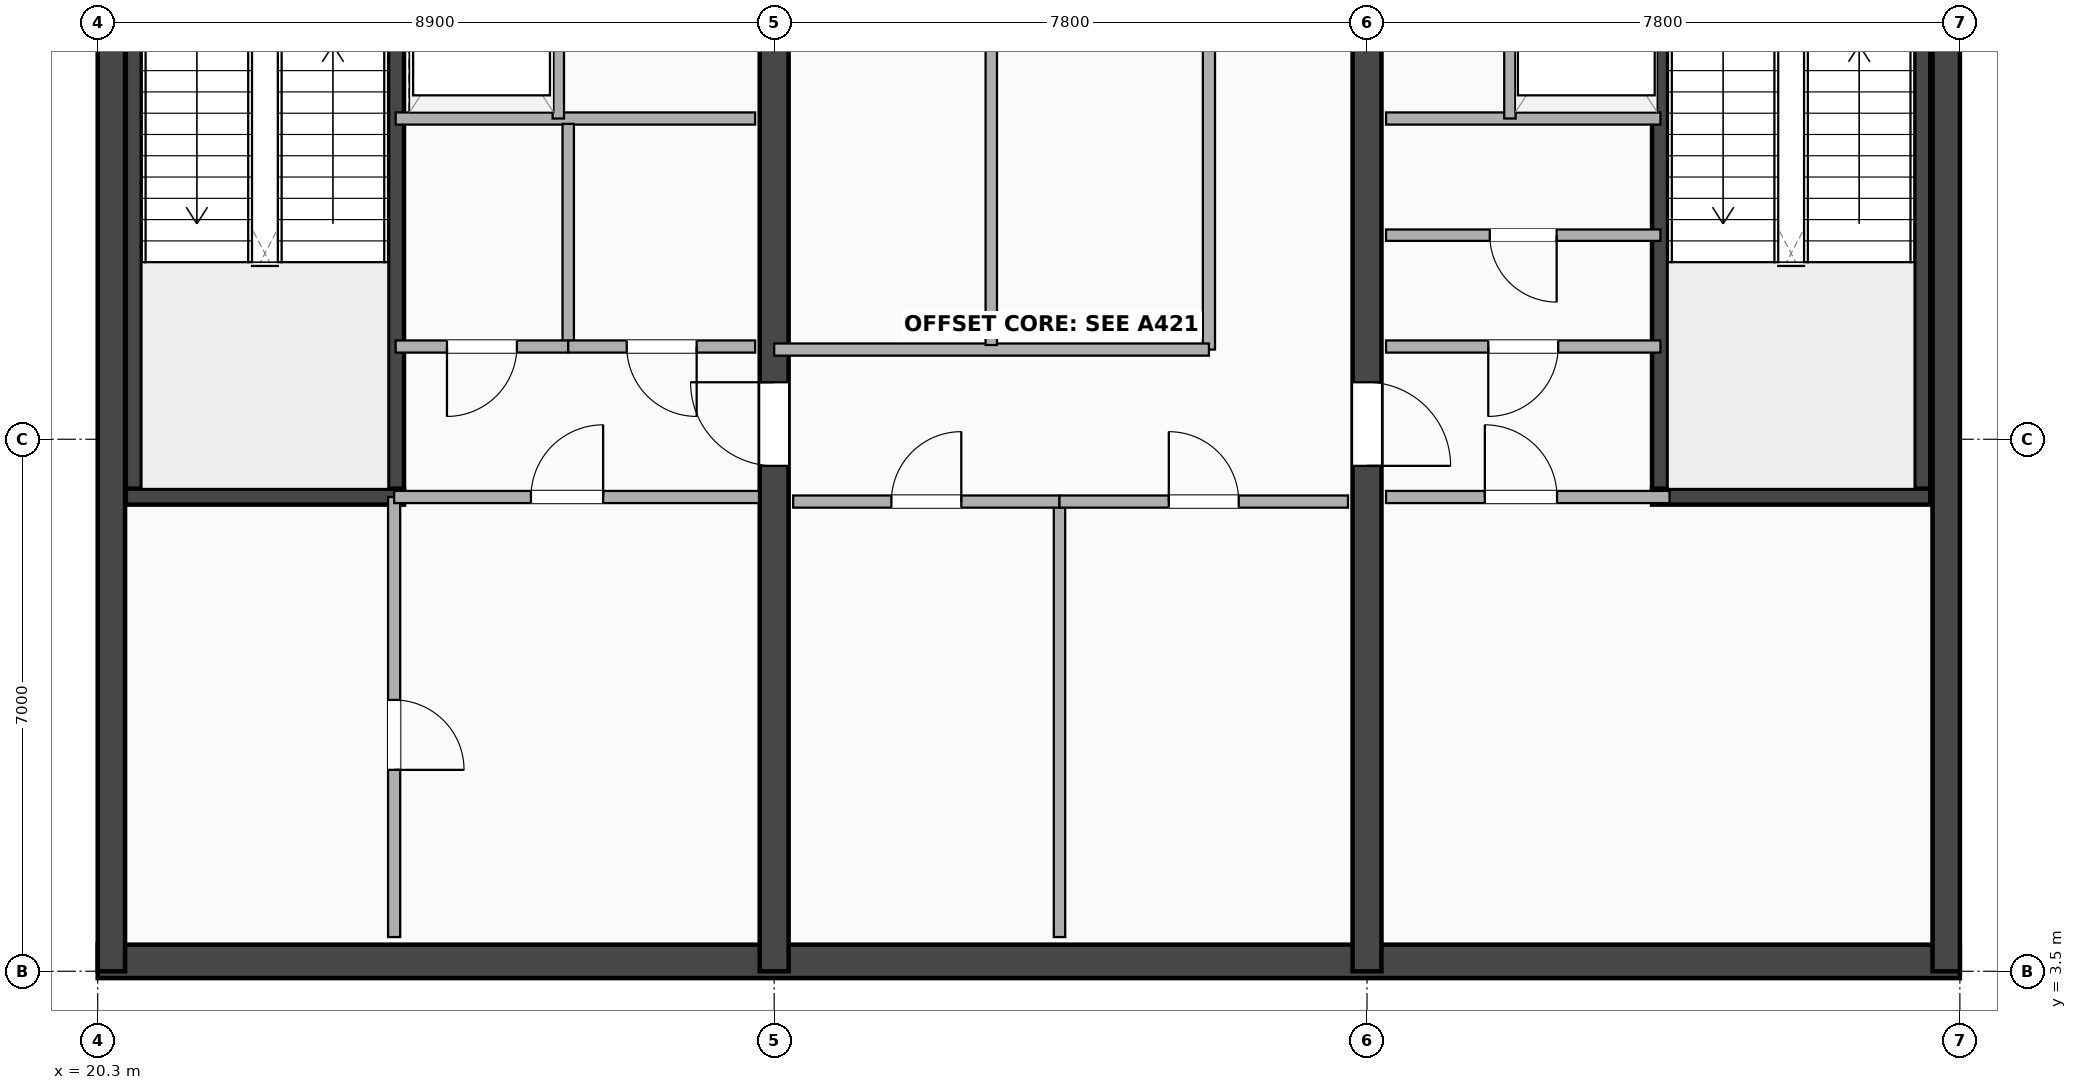
"""IFC4 building model, lengths in metres.
Left out: names, types, materials, properties, quantities, classifications, styles, units other than length and angle.
Written with IfcOpenShell. Run it as: python <this file> out.ifc"""

import sys

from ifc_helpers import new_model, si_unit, direction, frame, frame_2d, origin, place, context, subcontext, project, spatial, rectangle, extrude, element, fill, save


model = new_model("IFC4")
c1 = context("Model", 3, precision=1e-05, world=origin(), true_north=direction((0.0, 1.0)))
c2 = subcontext(c1, "Body", "Model", "MODEL_VIEW")
j1 = project(units=[si_unit("LENGTHUNIT", "METRE"), si_unit("PLANEANGLEUNIT", "RADIAN")], contexts=[c1])
p1 = place(None, origin())
s1 = spatial("IfcSite", under=j1, at=p1, CompositionType="ELEMENT")
p2 = place(p1, origin())
s2 = spatial("IfcBuilding", under=s1, at=p2, CompositionType="ELEMENT")
p3 = place(p2, frame((0.0, 0.0, 312.5)))
s3 = spatial("IfcBuildingStorey", under=s2, at=p3, CompositionType="ELEMENT", Elevation=312.5)
p4 = place(p3, frame((20.3, 3.63, 0.0), z_axis=(0.0, 0.0, 1.0), x_axis=(1.0, 0.0, 0.0)))
e1 = element("IfcWall", 1, at=p4, inside=s3, PredefinedType="SHEAR", context=c2, shape_type="SweptSolid", body=[
    extrude(rectangle(XDim=24.5, YDim=0.44, at=frame_2d((12.25, 0.0))), origin(), (0.0, 0.0, 1.0), 4.3),
])
for number, where, z_axis, x_axis in (
    (2, (20.48, 3.5, 0.0), (0.0, 0.0, 1.0), (0.0, 1.0, 0.0)),
    (3, (44.62, 3.5, 0.0), (0.0, 0.0, 1.0), (0.0, 1.0, 0.0)),
):
    element("IfcWall", number, at=place(p3, frame(where, z_axis=z_axis, x_axis=x_axis)), inside=s3, PredefinedType="SHEAR", context=c2, shape_type="SweptSolid", body=[
        extrude(rectangle(XDim=21.2, YDim=0.36, at=frame_2d((10.6, 0.0))), origin(), (0.0, 0.0, 1.0), 4.3),
    ])
p5 = place(p3, frame((29.2, 3.5, 0.0), z_axis=(0.0, 0.0, 1.0), x_axis=(0.0, 1.0, 0.0)))
e4 = element("IfcWall", 4, at=p5, inside=s3, PredefinedType="SHEAR", context=c2, shape_type="SweptSolid", body=[
    extrude(rectangle(XDim=14.95, YDim=0.38, at=frame_2d((7.475, 0.0))), origin(), (0.0, 0.0, 1.0), 4.3),
])
p6 = place(p5, frame((7.75, 0.0, 0.0), z_axis=(0.0, 0.0, 1.0), x_axis=(-1.0, 0.0, 0.0)))
e5 = element("IfcOpeningElement", 5, at=p6, cuts=e4, PredefinedType="OPENING", context=c2, shape_type="SweptSolid", body=[
    extrude(rectangle(XDim=1.1, YDim=2.15, at=frame_2d((0.55, 1.075))), frame((0.0, 0.2, 0.0), z_axis=(0.0, -1.0, 0.0), x_axis=(1.0, 0.0, 0.0)), (0.0, 0.0, 1.0), 0.4),
])
p7 = place(p3, frame((37.0, 3.5, 0.0), z_axis=(0.0, 0.0, 1.0), x_axis=(0.0, 1.0, 0.0)))
e6 = element("IfcWall", 6, at=p7, inside=s3, PredefinedType="SHEAR", context=c2, shape_type="SweptSolid", body=[
    extrude(rectangle(XDim=14.95, YDim=0.38, at=frame_2d((7.475, 0.0))), origin(), (0.0, 0.0, 1.0), 4.3),
])
p8 = place(p7, frame((6.65, 0.0, 0.0)))
e7 = element("IfcOpeningElement", 7, at=p8, cuts=e6, PredefinedType="OPENING", context=c2, shape_type="SweptSolid", body=[
    extrude(rectangle(XDim=1.1, YDim=2.15, at=frame_2d((0.55, 1.075))), frame((0.0, 0.2, 0.0), z_axis=(0.0, -1.0, 0.0), x_axis=(1.0, 0.0, 0.0)), (0.0, 0.0, 1.0), 0.4),
])
for number, where, z_axis, x_axis in (
    (8, (20.775, 9.745, 0.0), (0.0, 0.0, 1.0), (0.0, 1.0, 0.0)),
    (9, (24.225, 9.745, 0.0), (0.0, 0.0, 1.0), (0.0, 1.0, 0.0)),
):
    element("IfcWall", number, at=place(p3, frame(where, z_axis=z_axis, x_axis=x_axis)), inside=s3, PredefinedType="SHEAR", context=c2, shape_type="SweptSolid", body=[
        extrude(rectangle(XDim=8.01, YDim=0.21, at=frame_2d((4.005, 0.0))), origin(), (0.0, 0.0, 1.0), 4.3),
    ])
p9 = place(p3, frame((20.67, 9.745, 0.0), z_axis=(0.0, 0.0, 1.0), x_axis=(1.0, 0.0, 0.0)))
e10 = element("IfcWall", 10, at=p9, inside=s3, PredefinedType="SHEAR", context=c2, shape_type="SweptSolid", body=[
    extrude(rectangle(XDim=3.66, YDim=0.21, at=frame_2d((1.83, 0.0))), origin(), (0.0, 0.0, 1.0), 4.3),
])
for number, where, z_axis, x_axis in (
    (11, (40.855, 9.745, 0.0), (0.0, 0.0, 1.0), (0.0, 1.0, 0.0)),
    (12, (44.305, 9.745, 0.0), (0.0, 0.0, 1.0), (0.0, 1.0, 0.0)),
):
    element("IfcWall", number, at=place(p3, frame(where, z_axis=z_axis, x_axis=x_axis)), inside=s3, PredefinedType="SHEAR", context=c2, shape_type="SweptSolid", body=[
        extrude(rectangle(XDim=8.01, YDim=0.21, at=frame_2d((4.005, 0.0))), origin(), (0.0, 0.0, 1.0), 4.3),
    ])
p10 = place(p3, frame((40.75, 9.745, 0.0), z_axis=(0.0, 0.0, 1.0), x_axis=(1.0, 0.0, 0.0)))
e13 = element("IfcWall", 13, at=p10, inside=s3, PredefinedType="SHEAR", context=c2, shape_type="SweptSolid", body=[
    extrude(rectangle(XDim=3.66, YDim=0.21, at=frame_2d((1.83, 0.0))), origin(), (0.0, 0.0, 1.0), 4.3),
])
p11 = place(p3, frame((24.22, 14.72, 0.0), z_axis=(0.0, 0.0, 1.0), x_axis=(1.0, 0.0, 0.0)))
e14 = element("IfcWall", 14, at=p11, inside=s3, PredefinedType="PARTITIONING", context=c2, shape_type="SweptSolid", body=[
    extrude(rectangle(XDim=4.73, YDim=0.16, at=frame_2d((2.365, 0.0))), origin(), (0.0, 0.0, 1.0), 4.3),
])
p12 = place(p3, frame((26.36, 14.72, 0.0), z_axis=(0.0, 0.0, 1.0), x_axis=(0.0, 1.0, 0.0)))
e15 = element("IfcWall", 15, at=p12, inside=s3, PredefinedType="PARTITIONING", context=c2, shape_type="SweptSolid", body=[
    extrude(rectangle(XDim=3.04, YDim=0.15, at=frame_2d((1.52, 0.0))), origin(), (0.0, 0.0, 1.0), 4.3),
])
p13 = place(p3, frame((37.25, 14.72, 0.0), z_axis=(0.0, 0.0, 1.0), x_axis=(1.0, 0.0, 0.0)))
e16 = element("IfcWall", 16, at=p13, inside=s3, PredefinedType="PARTITIONING", context=c2, shape_type="SweptSolid", body=[
    extrude(rectangle(XDim=3.61, YDim=0.16, at=frame_2d((1.805, 0.0))), origin(), (0.0, 0.0, 1.0), 4.3),
])
p14 = place(p3, frame((38.88, 14.72, 0.0), z_axis=(0.0, 0.0, 1.0), x_axis=(0.0, 1.0, 0.0)))
e17 = element("IfcWall", 17, at=p14, inside=s3, PredefinedType="PARTITIONING", context=c2, shape_type="SweptSolid", body=[
    extrude(rectangle(XDim=3.04, YDim=0.15, at=frame_2d((1.52, 0.0))), origin(), (0.0, 0.0, 1.0), 4.3),
])
p15 = place(p3, frame((26.49, 11.72, 0.0), z_axis=(0.0, 0.0, 1.0), x_axis=(0.0, 1.0, 0.0)))
e18 = element("IfcWall", 18, at=p15, inside=s3, PredefinedType="PARTITIONING", context=c2, shape_type="SweptSolid", body=[
    extrude(rectangle(XDim=2.93, YDim=0.15, at=frame_2d((1.465, 0.0))), origin(), (0.0, 0.0, 1.0), 4.3),
])
p16 = place(p3, frame((24.22, 11.72, 0.0), z_axis=(0.0, 0.0, 1.0), x_axis=(1.0, 0.0, 0.0)))
e19 = element("IfcWall", 19, at=p16, inside=s3, PredefinedType="PARTITIONING", context=c2, shape_type="SweptSolid", body=[
    extrude(rectangle(XDim=2.271, YDim=0.16, at=frame_2d((1.135, 0.0))), origin(), (0.0, 0.0, 1.0), 4.3),
])
p17 = place(p16, frame((0.675, 0.0, 0.0)))
e20 = element("IfcOpeningElement", 20, at=p17, cuts=e19, PredefinedType="OPENING", context=c2, shape_type="SweptSolid", body=[
    extrude(rectangle(XDim=0.92, YDim=2.08, at=frame_2d((0.46, 1.04))), frame((0.0, 0.09, 0.0), z_axis=(0.0, -1.0, 0.0), x_axis=(1.0, 0.0, 0.0)), (0.0, 0.0, 1.0), 0.18),
])
p18 = place(p3, frame((26.49, 11.72, 0.0), z_axis=(0.0, 0.0, 1.0), x_axis=(1.0, 0.0, 0.0)))
e21 = element("IfcWall", 21, at=p18, inside=s3, PredefinedType="PARTITIONING", context=c2, shape_type="SweptSolid", body=[
    extrude(rectangle(XDim=2.459, YDim=0.16, at=frame_2d((1.23, 0.0))), origin(), (0.0, 0.0, 1.0), 4.3),
])
p19 = place(p18, frame((0.77, 0.0, 0.0)))
e22 = element("IfcOpeningElement", 22, at=p19, cuts=e21, PredefinedType="OPENING", context=c2, shape_type="SweptSolid", body=[
    extrude(rectangle(XDim=0.92, YDim=2.08, at=frame_2d((0.46, 1.04))), frame((0.0, 0.09, 0.0), z_axis=(0.0, -1.0, 0.0), x_axis=(1.0, 0.0, 0.0)), (0.0, 0.0, 1.0), 0.18),
])
p20 = place(p3, frame((37.25, 11.72, 0.0), z_axis=(0.0, 0.0, 1.0), x_axis=(1.0, 0.0, 0.0)))
e23 = element("IfcWall", 23, at=p20, inside=s3, PredefinedType="PARTITIONING", context=c2, shape_type="SweptSolid", body=[
    extrude(rectangle(XDim=3.61, YDim=0.16, at=frame_2d((1.805, 0.0))), origin(), (0.0, 0.0, 1.0), 4.3),
])
p21 = place(p20, frame((1.345, 0.0, 0.0)))
e24 = element("IfcOpeningElement", 24, at=p21, cuts=e23, PredefinedType="OPENING", context=c2, shape_type="SweptSolid", body=[
    extrude(rectangle(XDim=0.92, YDim=2.08, at=frame_2d((0.46, 1.04))), frame((0.0, 0.09, 0.0), z_axis=(0.0, -1.0, 0.0), x_axis=(1.0, 0.0, 0.0)), (0.0, 0.0, 1.0), 0.18),
])
p22 = place(p3, frame((37.25, 13.185, 0.0), z_axis=(0.0, 0.0, 1.0), x_axis=(1.0, 0.0, 0.0)))
e25 = element("IfcWall", 25, at=p22, inside=s3, PredefinedType="PARTITIONING", context=c2, shape_type="SweptSolid", body=[
    extrude(rectangle(XDim=3.61, YDim=0.15, at=frame_2d((1.805, 0.0))), origin(), (0.0, 0.0, 1.0), 4.3),
])
p23 = place(p22, frame((1.365, 0.0, 0.0)))
e26 = element("IfcOpeningElement", 26, at=p23, cuts=e25, PredefinedType="OPENING", context=c2, shape_type="SweptSolid", body=[
    extrude(rectangle(XDim=0.88, YDim=2.08, at=frame_2d((0.44, 1.04))), frame((0.0, 0.085, 0.0), z_axis=(0.0, -1.0, 0.0), x_axis=(1.0, 0.0, 0.0)), (0.0, 0.0, 1.0), 0.17),
])
p24 = place(p3, frame((24.2, 3.95, 0.0), z_axis=(0.0, 0.0, 1.0), x_axis=(0.0, 1.0, 0.0)))
e27 = element("IfcWall", 27, at=p24, inside=s3, PredefinedType="PARTITIONING", context=c2, shape_type="SweptSolid", body=[
    extrude(rectangle(XDim=5.79, YDim=0.16, at=frame_2d((2.895, 0.0))), origin(), (0.0, 0.0, 1.0), 4.3),
])
p25 = place(p24, frame((2.2, 0.0, 0.0)))
e28 = element("IfcOpeningElement", 28, at=p25, cuts=e27, PredefinedType="OPENING", context=c2, shape_type="SweptSolid", body=[
    extrude(rectangle(XDim=0.92, YDim=2.08, at=frame_2d((0.46, 1.04))), frame((0.0, 0.09, 0.0), z_axis=(0.0, -1.0, 0.0), x_axis=(1.0, 0.0, 0.0)), (0.0, 0.0, 1.0), 0.18),
])
p26 = place(p3, frame((24.2, 9.74, 0.0), z_axis=(0.0, 0.0, 1.0), x_axis=(1.0, 0.0, 0.0)))
e29 = element("IfcWall", 29, at=p26, inside=s3, PredefinedType="PARTITIONING", context=c2, shape_type="SweptSolid", body=[
    extrude(rectangle(XDim=4.8, YDim=0.16, at=frame_2d((2.4, 0.0))), origin(), (0.0, 0.0, 1.0), 4.3),
])
p27 = place(p26, frame((2.75, 0.0, 0.0), z_axis=(0.0, 0.0, 1.0), x_axis=(-1.0, 0.0, 0.0)))
e30 = element("IfcOpeningElement", 30, at=p27, cuts=e29, PredefinedType="OPENING", context=c2, shape_type="SweptSolid", body=[
    extrude(rectangle(XDim=0.95, YDim=2.15, at=frame_2d((0.475, 1.075))), frame((0.0, 0.09, 0.0), z_axis=(0.0, -1.0, 0.0), x_axis=(1.0, 0.0, 0.0)), (0.0, 0.0, 1.0), 0.18),
])
p28 = place(p3, frame((37.25, 9.74, 0.0), z_axis=(0.0, 0.0, 1.0), x_axis=(1.0, 0.0, 0.0)))
e31 = element("IfcWall", 31, at=p28, inside=s3, PredefinedType="PARTITIONING", context=c2, shape_type="SweptSolid", body=[
    extrude(rectangle(XDim=3.73, YDim=0.16, at=frame_2d((1.865, 0.0))), origin(), (0.0, 0.0, 1.0), 4.3),
])
p29 = place(p28, frame((2.25, 0.0, 0.0), z_axis=(0.0, 0.0, 1.0), x_axis=(-1.0, 0.0, 0.0)))
e32 = element("IfcOpeningElement", 32, at=p29, cuts=e31, PredefinedType="OPENING", context=c2, shape_type="SweptSolid", body=[
    extrude(rectangle(XDim=0.95, YDim=2.15, at=frame_2d((0.475, 1.075))), frame((0.0, 0.09, 0.0), z_axis=(0.0, -1.0, 0.0), x_axis=(1.0, 0.0, 0.0)), (0.0, 0.0, 1.0), 0.18),
])
p30 = place(p3, frame((34.92, 11.68, 0.0), z_axis=(0.0, 0.0, 1.0), x_axis=(0.0, 1.0, 0.0)))
e33 = element("IfcWall", 33, at=p30, inside=s3, PredefinedType="PARTITIONING", context=c2, shape_type="SweptSolid", body=[
    extrude(rectangle(XDim=6.1, YDim=0.16, at=frame_2d((3.05, 0.0))), origin(), (0.0, 0.0, 1.0), 4.3),
])
p31 = place(p3, frame((32.954, 3.95, 0.0), z_axis=(0.0, 0.0, 1.0), x_axis=(0.0, 1.0, 0.0)))
e34 = element("IfcWall", 34, at=p31, inside=s3, PredefinedType="PARTITIONING", context=c2, shape_type="SweptSolid", body=[
    extrude(rectangle(XDim=5.73, YDim=0.15, at=frame_2d((2.865, 0.0))), origin(), (0.0, 0.0, 1.0), 4.3),
])
p32 = place(p3, frame((29.45, 9.68, 0.0), z_axis=(0.0, 0.0, 1.0), x_axis=(1.0, 0.0, 0.0)))
e35 = element("IfcWall", 35, at=p32, inside=s3, PredefinedType="PARTITIONING", context=c2, shape_type="SweptSolid", body=[
    extrude(rectangle(XDim=3.504, YDim=0.16, at=frame_2d((1.752, 0.0))), origin(), (0.0, 0.0, 1.0), 4.3),
])
p33 = place(p32, frame((2.212, 0.0, 0.0), z_axis=(0.0, 0.0, 1.0), x_axis=(-1.0, 0.0, 0.0)))
e36 = element("IfcOpeningElement", 36, at=p33, cuts=e35, PredefinedType="OPENING", context=c2, shape_type="SweptSolid", body=[
    extrude(rectangle(XDim=0.92, YDim=2.08, at=frame_2d((0.46, 1.04))), frame((0.0, 0.09, 0.0), z_axis=(0.0, -1.0, 0.0), x_axis=(1.0, 0.0, 0.0)), (0.0, 0.0, 1.0), 0.18),
])
p34 = place(p3, frame((32.954, 9.68, 0.0), z_axis=(0.0, 0.0, 1.0), x_axis=(1.0, 0.0, 0.0)))
e37 = element("IfcWall", 37, at=p34, inside=s3, PredefinedType="PARTITIONING", context=c2, shape_type="SweptSolid", body=[
    extrude(rectangle(XDim=3.796, YDim=0.16, at=frame_2d((1.898, 0.0))), origin(), (0.0, 0.0, 1.0), 4.3),
])
p35 = place(p34, frame((2.358, 0.0, 0.0), z_axis=(0.0, 0.0, 1.0), x_axis=(-1.0, 0.0, 0.0)))
e38 = element("IfcOpeningElement", 38, at=p35, cuts=e37, PredefinedType="OPENING", context=c2, shape_type="SweptSolid", body=[
    extrude(rectangle(XDim=0.92, YDim=2.08, at=frame_2d((0.46, 1.04))), frame((0.0, 0.09, 0.0), z_axis=(0.0, -1.0, 0.0), x_axis=(1.0, 0.0, 0.0)), (0.0, 0.0, 1.0), 0.18),
])
p36 = place(p3, frame((29.2, 11.68, 0.0), z_axis=(0.0, 0.0, 1.0), x_axis=(1.0, 0.0, 0.0)))
e39 = element("IfcWall", 39, at=p36, inside=s3, PredefinedType="PARTITIONING", context=c2, shape_type="SweptSolid", body=[
    extrude(rectangle(XDim=5.72, YDim=0.16, at=frame_2d((2.86, 0.0))), origin(), (0.0, 0.0, 1.0), 4.3),
])
p37 = place(p3, frame((32.056, 11.74, 0.0), z_axis=(0.0, 0.0, 1.0), x_axis=(0.0, 1.0, 0.0)))
e40 = element("IfcWall", 40, at=p37, inside=s3, PredefinedType="PARTITIONING", context=c2, shape_type="SweptSolid", body=[
    extrude(rectangle(XDim=6.01, YDim=0.15, at=frame_2d((3.005, 0.0))), origin(), (0.0, 0.0, 1.0), 4.3),
])
p38 = place(p6, origin())
e41 = element("IfcDoor", 41, at=p38, inside=s3, OperationType="SINGLE_SWING_RIGHT", PredefinedType="DOOR", context=c2, shape_type="SweptSolid", body=[
    extrude(rectangle(XDim=1.1, YDim=2.15, at=frame_2d((0.55, 1.075))), frame((0.0, 0.025, 0.0), z_axis=(0.0, -1.0, 0.0), x_axis=(1.0, 0.0, 0.0)), (0.0, 0.0, 1.0), 0.05),
])
fill(e5, e41)
p39 = place(p8, origin())
e42 = element("IfcDoor", 42, at=p39, inside=s3, OperationType="SINGLE_SWING_LEFT", PredefinedType="DOOR", context=c2, shape_type="SweptSolid", body=[
    extrude(rectangle(XDim=1.1, YDim=2.15, at=frame_2d((0.55, 1.075))), frame((0.0, 0.025, 0.0), z_axis=(0.0, -1.0, 0.0), x_axis=(1.0, 0.0, 0.0)), (0.0, 0.0, 1.0), 0.05),
])
fill(e7, e42)
p40 = place(p17, origin())
e43 = element("IfcDoor", 43, at=p40, inside=s3, OperationType="SINGLE_SWING_LEFT", PredefinedType="DOOR", context=c2, shape_type="SweptSolid", body=[
    extrude(rectangle(XDim=0.92, YDim=2.08, at=frame_2d((0.46, 1.04))), frame((0.0, 0.025, 0.0), z_axis=(0.0, -1.0, 0.0), x_axis=(1.0, 0.0, 0.0)), (0.0, 0.0, 1.0), 0.05),
])
fill(e20, e43)
p41 = place(p19, origin())
e44 = element("IfcDoor", 44, at=p41, inside=s3, OperationType="SINGLE_SWING_RIGHT", PredefinedType="DOOR", context=c2, shape_type="SweptSolid", body=[
    extrude(rectangle(XDim=0.92, YDim=2.08, at=frame_2d((0.46, 1.04))), frame((0.0, 0.025, 0.0), z_axis=(0.0, -1.0, 0.0), x_axis=(1.0, 0.0, 0.0)), (0.0, 0.0, 1.0), 0.05),
])
fill(e22, e44)
p42 = place(p21, origin())
e45 = element("IfcDoor", 45, at=p42, inside=s3, OperationType="SINGLE_SWING_LEFT", PredefinedType="DOOR", context=c2, shape_type="SweptSolid", body=[
    extrude(rectangle(XDim=0.92, YDim=2.08, at=frame_2d((0.46, 1.04))), frame((0.0, 0.025, 0.0), z_axis=(0.0, -1.0, 0.0), x_axis=(1.0, 0.0, 0.0)), (0.0, 0.0, 1.0), 0.05),
])
fill(e24, e45)
p43 = place(p23, origin())
e46 = element("IfcDoor", 46, at=p43, inside=s3, OperationType="SINGLE_SWING_RIGHT", PredefinedType="DOOR", context=c2, shape_type="SweptSolid", body=[
    extrude(rectangle(XDim=0.88, YDim=2.08, at=frame_2d((0.44, 1.04))), frame((0.0, 0.025, 0.0), z_axis=(0.0, -1.0, 0.0), x_axis=(1.0, 0.0, 0.0)), (0.0, 0.0, 1.0), 0.05),
])
fill(e26, e46)
p44 = place(p25, origin())
e47 = element("IfcDoor", 47, at=p44, inside=s3, OperationType="SINGLE_SWING_LEFT", PredefinedType="DOOR", context=c2, shape_type="SweptSolid", body=[
    extrude(rectangle(XDim=0.92, YDim=2.08, at=frame_2d((0.46, 1.04))), frame((0.0, 0.025, 0.0), z_axis=(0.0, -1.0, 0.0), x_axis=(1.0, 0.0, 0.0)), (0.0, 0.0, 1.0), 0.05),
])
fill(e28, e47)
p45 = place(p27, origin())
e48 = element("IfcDoor", 48, at=p45, inside=s3, OperationType="SINGLE_SWING_RIGHT", PredefinedType="DOOR", context=c2, shape_type="SweptSolid", body=[
    extrude(rectangle(XDim=0.95, YDim=2.15, at=frame_2d((0.475, 1.075))), frame((0.0, 0.025, 0.0), z_axis=(0.0, -1.0, 0.0), x_axis=(1.0, 0.0, 0.0)), (0.0, 0.0, 1.0), 0.05),
])
fill(e30, e48)
p46 = place(p29, origin())
e49 = element("IfcDoor", 49, at=p46, inside=s3, OperationType="SINGLE_SWING_LEFT", PredefinedType="DOOR", context=c2, shape_type="SweptSolid", body=[
    extrude(rectangle(XDim=0.95, YDim=2.15, at=frame_2d((0.475, 1.075))), frame((0.0, 0.025, 0.0), z_axis=(0.0, -1.0, 0.0), x_axis=(1.0, 0.0, 0.0)), (0.0, 0.0, 1.0), 0.05),
])
fill(e32, e49)
p47 = place(p33, origin())
e50 = element("IfcDoor", 50, at=p47, inside=s3, OperationType="SINGLE_SWING_RIGHT", PredefinedType="DOOR", context=c2, shape_type="SweptSolid", body=[
    extrude(rectangle(XDim=0.92, YDim=2.08, at=frame_2d((0.46, 1.04))), frame((0.0, 0.025, 0.0), z_axis=(0.0, -1.0, 0.0), x_axis=(1.0, 0.0, 0.0)), (0.0, 0.0, 1.0), 0.05),
])
fill(e36, e50)
p48 = place(p35, origin())
e51 = element("IfcDoor", 51, at=p48, inside=s3, OperationType="SINGLE_SWING_LEFT", PredefinedType="DOOR", context=c2, shape_type="SweptSolid", body=[
    extrude(rectangle(XDim=0.92, YDim=2.08, at=frame_2d((0.46, 1.04))), frame((0.0, 0.025, 0.0), z_axis=(0.0, -1.0, 0.0), x_axis=(1.0, 0.0, 0.0)), (0.0, 0.0, 1.0), 0.05),
])
fill(e38, e51)
save(model, sys.argv[1])
